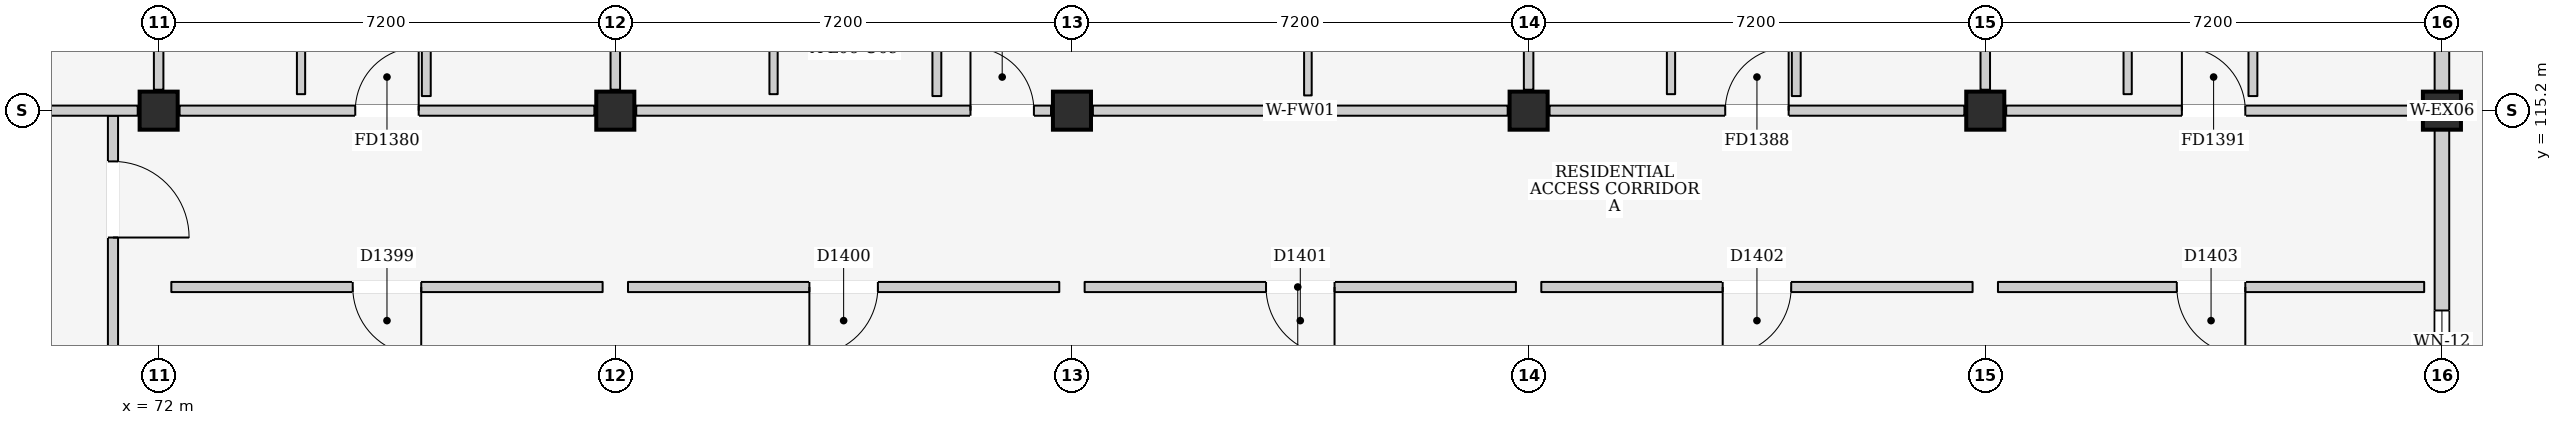
"""IFC4 building model, lengths in metres.
Left out: names, types, materials, properties, quantities, classifications, styles, units other than length and angle.
Written with IfcOpenShell. Run it as: python <this file> out.ifc"""

import sys

from ifc_helpers import new_model, si_unit, direction, frame, frame_2d, origin, origin_2d, place, context, subcontext, project, spatial, rectangle, extrude, element, fill, save


model = new_model("IFC4")
c1 = context("Model", 3, precision=1e-05, world=origin(), true_north=direction((0.0, 1.0)))
c2 = subcontext(c1, "Body", "Model", "MODEL_VIEW")
j1 = project(units=[si_unit("LENGTHUNIT", "METRE"), si_unit("PLANEANGLEUNIT", "RADIAN")], contexts=[c1])
p1 = place(None, origin())
s1 = spatial("IfcSite", under=j1, at=p1, CompositionType="ELEMENT")
p2 = place(p1, origin())
s2 = spatial("IfcBuilding", under=s1, at=p2, CompositionType="ELEMENT")
p3 = place(p2, frame((0.0, 0.0, 21.9)))
s3 = spatial("IfcBuildingStorey", under=s2, at=p3, CompositionType="ELEMENT", Elevation=21.9)
for number, where, z_axis, x_axis in (
    (1, (72.0, 115.2, 0.0), (0.0, 0.0, 1.0), (1.0, 0.0, 0.0)),
    (2, (79.2, 115.2, 0.0), (0.0, 0.0, 1.0), (1.0, 0.0, 0.0)),
    (3, (86.4, 115.2, 0.0), (0.0, 0.0, 1.0), (1.0, 0.0, 0.0)),
    (4, (93.6, 115.2, 0.0), (0.0, 0.0, 1.0), (1.0, 0.0, 0.0)),
    (5, (100.8, 115.2, 0.0), (0.0, 0.0, 1.0), (1.0, 0.0, 0.0)),
    (6, (108.0, 115.2, 0.0), (0.0, 0.0, 1.0), (1.0, 0.0, 0.0)),
):
    element("IfcColumn", number, at=place(p3, frame(where, z_axis=z_axis, x_axis=x_axis)), inside=s3, PredefinedType="COLUMN", context=c2, shape_type="SweptSolid", body=[
        extrude(rectangle(XDim=0.6, YDim=0.6, at=origin_2d()), origin(), (0.0, 0.0, 1.0), 3.2),
    ])
p4 = place(p3, frame((108.0, 108.3, 0.0), z_axis=(0.0, 0.0, 1.0), x_axis=(0.0, 1.0, 0.0)))
e7 = element("IfcWall", 7, at=p4, inside=s3, PredefinedType="ELEMENTEDWALL", context=c2, shape_type="SweptSolid", body=[
    extrude(rectangle(XDim=6.6, YDim=0.23, at=frame_2d((3.3, 0.0))), origin(), (0.0, 0.0, 1.0), 2.465),
])
p5 = place(p4, frame((2.75, 0.0, 1.1)))
e8 = element("IfcOpeningElement", 8, at=p5, cuts=e7, PredefinedType="OPENING", context=c2, shape_type="SweptSolid", body=[
    extrude(rectangle(XDim=1.0, YDim=0.9, at=frame_2d((0.5, 0.45))), frame((0.0, 0.13, 0.0), z_axis=(0.0, -1.0, 0.0), x_axis=(1.0, 0.0, 0.0)), (0.0, 0.0, 1.0), 0.26),
])
p6 = place(p3, frame((108.0, 115.5, 0.0), z_axis=(0.0, 0.0, 1.0), x_axis=(0.0, 1.0, 0.0)))
e9 = element("IfcWall", 9, at=p6, inside=s3, PredefinedType="ELEMENTEDWALL", context=c2, shape_type="SweptSolid", body=[
    extrude(rectangle(XDim=6.6, YDim=0.23, at=frame_2d((3.3, 0.0))), origin(), (0.0, 0.0, 1.0), 2.465),
])
p7 = place(p6, frame((3.6, 0.0, 0.0)))
e10 = element("IfcOpeningElement", 10, at=p7, cuts=e9, PredefinedType="OPENING", context=c2, shape_type="SweptSolid", body=[
    extrude(rectangle(XDim=1.08, YDim=2.12, at=frame_2d((0.54, 1.06))), frame((0.0, 0.13, 0.0), z_axis=(0.0, -1.0, 0.0), x_axis=(1.0, 0.0, 0.0)), (0.0, 0.0, 1.0), 0.26),
])
p8 = place(p3, frame((71.28, 110.8, 0.0), z_axis=(0.0, 0.0, 1.0), x_axis=(0.0, 1.0, 0.0)))
e11 = element("IfcWall", 11, at=p8, inside=s3, PredefinedType="PARTITIONING", context=c2, shape_type="SweptSolid", body=[
    extrude(rectangle(XDim=4.32, YDim=0.16, at=frame_2d((2.16, 0.0))), origin(), (0.0, 0.0, 1.0), 2.98),
])
p9 = place(p8, frame((2.4, 0.0, 0.0)))
e12 = element("IfcOpeningElement", 12, at=p9, cuts=e11, PredefinedType="OPENING", context=c2, shape_type="SweptSolid", body=[
    extrude(rectangle(XDim=1.2, YDim=2.2, at=frame_2d((0.6, 1.1))), frame((0.0, 0.095, 0.0), z_axis=(0.0, -1.0, 0.0), x_axis=(1.0, 0.0, 0.0)), (0.0, 0.0, 1.0), 0.19),
])
p10 = place(p3, frame((65.13, 115.2, 0.0), z_axis=(0.0, 0.0, 1.0), x_axis=(1.0, 0.0, 0.0)))
e13 = element("IfcWall", 13, at=p10, inside=s3, PredefinedType="PARTITIONING", context=c2, shape_type="SweptSolid", body=[
    extrude(rectangle(XDim=6.54, YDim=0.16, at=frame_2d((3.27, 0.0))), origin(), (0.0, 0.0, 1.0), 2.315),
])
p11 = place(p10, frame((2.77, 0.0, 0.0)))
e14 = element("IfcOpeningElement", 14, at=p11, cuts=e13, PredefinedType="OPENING", context=c2, shape_type="SweptSolid", body=[
    extrude(rectangle(XDim=1.0, YDim=2.15, at=frame_2d((0.5, 1.075))), frame((0.0, 0.095, 0.0), z_axis=(0.0, -1.0, 0.0), x_axis=(1.0, 0.0, 0.0)), (0.0, 0.0, 1.0), 0.19),
])
p12 = place(p3, frame((72.0, 115.53, 0.0), z_axis=(0.0, 0.0, 1.0), x_axis=(0.0, 1.0, 0.0)))
e15 = element("IfcWall", 15, at=p12, inside=s3, PredefinedType="PARTITIONING", context=c2, shape_type="SweptSolid", body=[
    extrude(rectangle(XDim=6.54, YDim=0.15, at=frame_2d((3.27, 0.0))), origin(), (0.0, 0.0, 1.0), 2.465),
])
p13 = place(p3, frame((72.33, 115.2, 0.0), z_axis=(0.0, 0.0, 1.0), x_axis=(1.0, 0.0, 0.0)))
e16 = element("IfcWall", 16, at=p13, inside=s3, PredefinedType="PARTITIONING", context=c2, shape_type="SweptSolid", body=[
    extrude(rectangle(XDim=6.54, YDim=0.16, at=frame_2d((3.27, 0.0))), origin(), (0.0, 0.0, 1.0), 2.315),
])
p14 = place(p13, frame((2.77, 0.0, 0.0)))
e17 = element("IfcOpeningElement", 17, at=p14, cuts=e16, PredefinedType="OPENING", context=c2, shape_type="SweptSolid", body=[
    extrude(rectangle(XDim=1.0, YDim=2.15, at=frame_2d((0.5, 1.075))), frame((0.0, 0.095, 0.0), z_axis=(0.0, -1.0, 0.0), x_axis=(1.0, 0.0, 0.0)), (0.0, 0.0, 1.0), 0.19),
])
p15 = place(p3, frame((79.2, 115.53, 0.0), z_axis=(0.0, 0.0, 1.0), x_axis=(0.0, 1.0, 0.0)))
e18 = element("IfcWall", 18, at=p15, inside=s3, PredefinedType="PARTITIONING", context=c2, shape_type="SweptSolid", body=[
    extrude(rectangle(XDim=6.54, YDim=0.15, at=frame_2d((3.27, 0.0))), origin(), (0.0, 0.0, 1.0), 2.465),
])
p16 = place(p3, frame((74.245, 115.46, 0.0), z_axis=(0.0, 0.0, 1.0), x_axis=(0.0, 1.0, 0.0)))
e19 = element("IfcWall", 19, at=p16, inside=s3, PredefinedType="PARTITIONING", context=c2, shape_type="SweptSolid", body=[
    extrude(rectangle(XDim=2.13, YDim=0.13, at=frame_2d((1.065, 0.0))), origin(), (0.0, 0.0, 1.0), 2.98),
])
p17 = place(p3, frame((76.22, 115.43, 0.0), z_axis=(0.0, 0.0, 1.0), x_axis=(0.0, 1.0, 0.0)))
e20 = element("IfcWall", 20, at=p17, inside=s3, PredefinedType="PARTITIONING", context=c2, shape_type="SweptSolid", body=[
    extrude(rectangle(XDim=2.15, YDim=0.14, at=frame_2d((1.075, 0.0))), origin(), (0.0, 0.0, 1.0), 2.98),
])
p18 = place(p3, frame((79.53, 115.2, 0.0), z_axis=(0.0, 0.0, 1.0), x_axis=(1.0, 0.0, 0.0)))
e21 = element("IfcWall", 21, at=p18, inside=s3, PredefinedType="PARTITIONING", context=c2, shape_type="SweptSolid", body=[
    extrude(rectangle(XDim=6.54, YDim=0.16, at=frame_2d((3.27, 0.0))), origin(), (0.0, 0.0, 1.0), 2.315),
])
p19 = place(p18, frame((5.27, 0.0, 0.0)))
e22 = element("IfcOpeningElement", 22, at=p19, cuts=e21, PredefinedType="OPENING", context=c2, shape_type="SweptSolid", body=[
    extrude(rectangle(XDim=1.0, YDim=2.15, at=frame_2d((0.5, 1.075))), frame((0.0, 0.095, 0.0), z_axis=(0.0, -1.0, 0.0), x_axis=(1.0, 0.0, 0.0)), (0.0, 0.0, 1.0), 0.19),
])
p20 = place(p3, frame((86.73, 115.2, 0.0), z_axis=(0.0, 0.0, 1.0), x_axis=(1.0, 0.0, 0.0)))
e23 = element("IfcWall", 23, at=p20, inside=s3, PredefinedType="PARTITIONING", context=c2, shape_type="SweptSolid", body=[
    extrude(rectangle(XDim=6.54, YDim=0.16, at=frame_2d((3.27, 0.0))), origin(), (0.0, 0.0, 1.0), 2.315),
])
p21 = place(p3, frame((93.6, 115.53, 0.0), z_axis=(0.0, 0.0, 1.0), x_axis=(0.0, 1.0, 0.0)))
e24 = element("IfcWall", 24, at=p21, inside=s3, PredefinedType="PARTITIONING", context=c2, shape_type="SweptSolid", body=[
    extrude(rectangle(XDim=6.54, YDim=0.15, at=frame_2d((3.27, 0.0))), origin(), (0.0, 0.0, 1.0), 2.465),
])
p22 = place(p3, frame((81.695, 115.46, 0.0), z_axis=(0.0, 0.0, 1.0), x_axis=(0.0, 1.0, 0.0)))
e25 = element("IfcWall", 25, at=p22, inside=s3, PredefinedType="PARTITIONING", context=c2, shape_type="SweptSolid", body=[
    extrude(rectangle(XDim=3.04, YDim=0.13, at=frame_2d((1.52, 0.0))), origin(), (0.0, 0.0, 1.0), 2.98),
])
p23 = place(p3, frame((84.27, 115.43, 0.0), z_axis=(0.0, 0.0, 1.0), x_axis=(0.0, 1.0, 0.0)))
e26 = element("IfcWall", 26, at=p23, inside=s3, PredefinedType="PARTITIONING", context=c2, shape_type="SweptSolid", body=[
    extrude(rectangle(XDim=3.06, YDim=0.14, at=frame_2d((1.53, 0.0))), origin(), (0.0, 0.0, 1.0), 2.98),
])
p24 = place(p3, frame((90.12, 115.44, 0.0), z_axis=(0.0, 0.0, 1.0), x_axis=(0.0, 1.0, 0.0)))
e27 = element("IfcWall", 27, at=p24, inside=s3, PredefinedType="PARTITIONING", context=c2, shape_type="SweptSolid", body=[
    extrude(rectangle(XDim=3.04, YDim=0.12, at=frame_2d((1.52, 0.0))), origin(), (0.0, 0.0, 1.0), 2.98),
])
p25 = place(p24, frame((1.04, 0.0, 0.0)))
e28 = element("IfcOpeningElement", 28, at=p25, cuts=e27, PredefinedType="OPENING", context=c2, shape_type="SweptSolid", body=[
    extrude(rectangle(XDim=0.96, YDim=2.15, at=frame_2d((0.48, 1.075))), frame((0.0, 0.075, 0.0), z_axis=(0.0, -1.0, 0.0), x_axis=(1.0, 0.0, 0.0)), (0.0, 0.0, 1.0), 0.15),
])
p26 = place(p3, frame((93.93, 115.2, 0.0), z_axis=(0.0, 0.0, 1.0), x_axis=(1.0, 0.0, 0.0)))
e29 = element("IfcWall", 29, at=p26, inside=s3, PredefinedType="PARTITIONING", context=c2, shape_type="SweptSolid", body=[
    extrude(rectangle(XDim=6.54, YDim=0.16, at=frame_2d((3.27, 0.0))), origin(), (0.0, 0.0, 1.0), 2.315),
])
p27 = place(p26, frame((2.77, 0.0, 0.0)))
e30 = element("IfcOpeningElement", 30, at=p27, cuts=e29, PredefinedType="OPENING", context=c2, shape_type="SweptSolid", body=[
    extrude(rectangle(XDim=1.0, YDim=2.15, at=frame_2d((0.5, 1.075))), frame((0.0, 0.095, 0.0), z_axis=(0.0, -1.0, 0.0), x_axis=(1.0, 0.0, 0.0)), (0.0, 0.0, 1.0), 0.19),
])
p28 = place(p3, frame((100.8, 115.53, 0.0), z_axis=(0.0, 0.0, 1.0), x_axis=(0.0, 1.0, 0.0)))
e31 = element("IfcWall", 31, at=p28, inside=s3, PredefinedType="PARTITIONING", context=c2, shape_type="SweptSolid", body=[
    extrude(rectangle(XDim=6.54, YDim=0.15, at=frame_2d((3.27, 0.0))), origin(), (0.0, 0.0, 1.0), 2.465),
])
p29 = place(p3, frame((95.845, 115.46, 0.0), z_axis=(0.0, 0.0, 1.0), x_axis=(0.0, 1.0, 0.0)))
e32 = element("IfcWall", 32, at=p29, inside=s3, PredefinedType="PARTITIONING", context=c2, shape_type="SweptSolid", body=[
    extrude(rectangle(XDim=2.13, YDim=0.13, at=frame_2d((1.065, 0.0))), origin(), (0.0, 0.0, 1.0), 2.98),
])
p30 = place(p3, frame((97.82, 115.43, 0.0), z_axis=(0.0, 0.0, 1.0), x_axis=(0.0, 1.0, 0.0)))
e33 = element("IfcWall", 33, at=p30, inside=s3, PredefinedType="PARTITIONING", context=c2, shape_type="SweptSolid", body=[
    extrude(rectangle(XDim=2.15, YDim=0.14, at=frame_2d((1.075, 0.0))), origin(), (0.0, 0.0, 1.0), 2.98),
])
p31 = place(p3, frame((101.13, 115.2, 0.0), z_axis=(0.0, 0.0, 1.0), x_axis=(1.0, 0.0, 0.0)))
e34 = element("IfcWall", 34, at=p31, inside=s3, PredefinedType="PARTITIONING", context=c2, shape_type="SweptSolid", body=[
    extrude(rectangle(XDim=6.54, YDim=0.16, at=frame_2d((3.27, 0.0))), origin(), (0.0, 0.0, 1.0), 2.315),
])
p32 = place(p31, frame((2.77, 0.0, 0.0)))
e35 = element("IfcOpeningElement", 35, at=p32, cuts=e34, PredefinedType="OPENING", context=c2, shape_type="SweptSolid", body=[
    extrude(rectangle(XDim=1.0, YDim=2.15, at=frame_2d((0.5, 1.075))), frame((0.0, 0.095, 0.0), z_axis=(0.0, -1.0, 0.0), x_axis=(1.0, 0.0, 0.0)), (0.0, 0.0, 1.0), 0.19),
])
p33 = place(p3, frame((103.045, 115.46, 0.0), z_axis=(0.0, 0.0, 1.0), x_axis=(0.0, 1.0, 0.0)))
e36 = element("IfcWall", 36, at=p33, inside=s3, PredefinedType="PARTITIONING", context=c2, shape_type="SweptSolid", body=[
    extrude(rectangle(XDim=2.13, YDim=0.13, at=frame_2d((1.065, 0.0))), origin(), (0.0, 0.0, 1.0), 2.98),
])
p34 = place(p3, frame((105.02, 115.43, 0.0), z_axis=(0.0, 0.0, 1.0), x_axis=(0.0, 1.0, 0.0)))
e37 = element("IfcWall", 37, at=p34, inside=s3, PredefinedType="PARTITIONING", context=c2, shape_type="SweptSolid", body=[
    extrude(rectangle(XDim=2.15, YDim=0.14, at=frame_2d((1.075, 0.0))), origin(), (0.0, 0.0, 1.0), 2.98),
])
p35 = place(p3, frame((72.2, 112.42, 0.0), z_axis=(0.0, 0.0, 1.0), x_axis=(1.0, 0.0, 0.0)))
e38 = element("IfcWall", 38, at=p35, inside=s3, PredefinedType="PARTITIONING", context=c2, shape_type="SweptSolid", body=[
    extrude(rectangle(XDim=6.8, YDim=0.16, at=frame_2d((3.4, 0.0))), origin(), (0.0, 0.0, 1.0), 2.98),
])
p36 = place(p35, frame((2.86, 0.0, 0.0)))
e39 = element("IfcOpeningElement", 39, at=p36, cuts=e38, PredefinedType="OPENING", context=c2, shape_type="SweptSolid", body=[
    extrude(rectangle(XDim=1.08, YDim=2.22, at=frame_2d((0.54, 1.11))), frame((0.0, 0.095, 0.0), z_axis=(0.0, -1.0, 0.0), x_axis=(1.0, 0.0, 0.0)), (0.0, 0.0, 1.0), 0.19),
])
p37 = place(p3, frame((79.4, 112.42, 0.0), z_axis=(0.0, 0.0, 1.0), x_axis=(1.0, 0.0, 0.0)))
e40 = element("IfcWall", 40, at=p37, inside=s3, PredefinedType="PARTITIONING", context=c2, shape_type="SweptSolid", body=[
    extrude(rectangle(XDim=6.8, YDim=0.16, at=frame_2d((3.4, 0.0))), origin(), (0.0, 0.0, 1.0), 2.98),
])
p38 = place(p37, frame((2.86, 0.0, 0.0)))
e41 = element("IfcOpeningElement", 41, at=p38, cuts=e40, PredefinedType="OPENING", context=c2, shape_type="SweptSolid", body=[
    extrude(rectangle(XDim=1.08, YDim=2.22, at=frame_2d((0.54, 1.11))), frame((0.0, 0.095, 0.0), z_axis=(0.0, -1.0, 0.0), x_axis=(1.0, 0.0, 0.0)), (0.0, 0.0, 1.0), 0.19),
])
p39 = place(p3, frame((86.6, 112.42, 0.0), z_axis=(0.0, 0.0, 1.0), x_axis=(1.0, 0.0, 0.0)))
e42 = element("IfcWall", 42, at=p39, inside=s3, PredefinedType="PARTITIONING", context=c2, shape_type="SweptSolid", body=[
    extrude(rectangle(XDim=6.8, YDim=0.16, at=frame_2d((3.4, 0.0))), origin(), (0.0, 0.0, 1.0), 2.98),
])
p40 = place(p39, frame((2.86, 0.0, 0.0)))
e43 = element("IfcOpeningElement", 43, at=p40, cuts=e42, PredefinedType="OPENING", context=c2, shape_type="SweptSolid", body=[
    extrude(rectangle(XDim=1.08, YDim=2.22, at=frame_2d((0.54, 1.11))), frame((0.0, 0.095, 0.0), z_axis=(0.0, -1.0, 0.0), x_axis=(1.0, 0.0, 0.0)), (0.0, 0.0, 1.0), 0.19),
])
p41 = place(p3, frame((93.8, 112.42, 0.0), z_axis=(0.0, 0.0, 1.0), x_axis=(1.0, 0.0, 0.0)))
e44 = element("IfcWall", 44, at=p41, inside=s3, PredefinedType="PARTITIONING", context=c2, shape_type="SweptSolid", body=[
    extrude(rectangle(XDim=6.8, YDim=0.16, at=frame_2d((3.4, 0.0))), origin(), (0.0, 0.0, 1.0), 2.98),
])
p42 = place(p41, frame((2.86, 0.0, 0.0)))
e45 = element("IfcOpeningElement", 45, at=p42, cuts=e44, PredefinedType="OPENING", context=c2, shape_type="SweptSolid", body=[
    extrude(rectangle(XDim=1.08, YDim=2.22, at=frame_2d((0.54, 1.11))), frame((0.0, 0.095, 0.0), z_axis=(0.0, -1.0, 0.0), x_axis=(1.0, 0.0, 0.0)), (0.0, 0.0, 1.0), 0.19),
])
p43 = place(p3, frame((101.0, 112.42, 0.0), z_axis=(0.0, 0.0, 1.0), x_axis=(1.0, 0.0, 0.0)))
e46 = element("IfcWall", 46, at=p43, inside=s3, PredefinedType="PARTITIONING", context=c2, shape_type="SweptSolid", body=[
    extrude(rectangle(XDim=6.72, YDim=0.16, at=frame_2d((3.36, 0.0))), origin(), (0.0, 0.0, 1.0), 2.98),
])
p44 = place(p43, frame((2.82, 0.0, 0.0)))
e47 = element("IfcOpeningElement", 47, at=p44, cuts=e46, PredefinedType="OPENING", context=c2, shape_type="SweptSolid", body=[
    extrude(rectangle(XDim=1.08, YDim=2.22, at=frame_2d((0.54, 1.11))), frame((0.0, 0.095, 0.0), z_axis=(0.0, -1.0, 0.0), x_axis=(1.0, 0.0, 0.0)), (0.0, 0.0, 1.0), 0.19),
])
p45 = place(p5, origin())
e48 = element("IfcWindow", 48, at=p45, inside=s3, PartitioningType="SINGLE_PANEL", PredefinedType="WINDOW", context=c2, shape_type="SweptSolid", body=[
    extrude(rectangle(XDim=1.0, YDim=0.9, at=frame_2d((0.5, 0.45))), frame((0.0, 0.03, 0.0), z_axis=(0.0, -1.0, 0.0), x_axis=(1.0, 0.0, 0.0)), (0.0, 0.0, 1.0), 0.06),
])
fill(e8, e48)
p46 = place(p9, frame((1.2, 0.0, 0.0), z_axis=(0.0, 0.0, 1.0), x_axis=(-1.0, 0.0, 0.0)))
e49 = element("IfcDoor", 49, at=p46, inside=s3, OperationType="SINGLE_SWING_RIGHT", PredefinedType="DOOR", context=c2, shape_type="SweptSolid", body=[
    extrude(rectangle(XDim=1.2, YDim=2.2, at=frame_2d((0.6, 1.1))), frame((0.0, 0.025, 0.0), z_axis=(0.0, -1.0, 0.0), x_axis=(1.0, 0.0, 0.0)), (0.0, 0.0, 1.0), 0.05),
])
fill(e12, e49)
p47 = place(p14, origin())
e50 = element("IfcDoor", 50, at=p47, inside=s3, OperationType="SINGLE_SWING_RIGHT", PredefinedType="DOOR", context=c2, shape_type="SweptSolid", body=[
    extrude(rectangle(XDim=1.0, YDim=2.15, at=frame_2d((0.5, 1.075))), frame((0.0, 0.025, 0.0), z_axis=(0.0, -1.0, 0.0), x_axis=(1.0, 0.0, 0.0)), (0.0, 0.0, 1.0), 0.05),
])
fill(e17, e50)
p48 = place(p19, origin())
e51 = element("IfcDoor", 51, at=p48, inside=s3, OperationType="SINGLE_SWING_LEFT", PredefinedType="DOOR", context=c2, shape_type="SweptSolid", body=[
    extrude(rectangle(XDim=1.0, YDim=2.15, at=frame_2d((0.5, 1.075))), frame((0.0, 0.025, 0.0), z_axis=(0.0, -1.0, 0.0), x_axis=(1.0, 0.0, 0.0)), (0.0, 0.0, 1.0), 0.05),
])
fill(e22, e51)
p49 = place(p27, origin())
e52 = element("IfcDoor", 52, at=p49, inside=s3, OperationType="SINGLE_SWING_RIGHT", PredefinedType="DOOR", context=c2, shape_type="SweptSolid", body=[
    extrude(rectangle(XDim=1.0, YDim=2.15, at=frame_2d((0.5, 1.075))), frame((0.0, 0.025, 0.0), z_axis=(0.0, -1.0, 0.0), x_axis=(1.0, 0.0, 0.0)), (0.0, 0.0, 1.0), 0.05),
])
fill(e30, e52)
p50 = place(p32, origin())
e53 = element("IfcDoor", 53, at=p50, inside=s3, OperationType="SINGLE_SWING_LEFT", PredefinedType="DOOR", context=c2, shape_type="SweptSolid", body=[
    extrude(rectangle(XDim=1.0, YDim=2.15, at=frame_2d((0.5, 1.075))), frame((0.0, 0.025, 0.0), z_axis=(0.0, -1.0, 0.0), x_axis=(1.0, 0.0, 0.0)), (0.0, 0.0, 1.0), 0.05),
])
fill(e35, e53)
p51 = place(p36, frame((1.08, 0.0, 0.0), z_axis=(0.0, 0.0, 1.0), x_axis=(-1.0, 0.0, 0.0)))
e54 = element("IfcDoor", 54, at=p51, inside=s3, OperationType="SINGLE_SWING_LEFT", PredefinedType="DOOR", context=c2, shape_type="SweptSolid", body=[
    extrude(rectangle(XDim=1.08, YDim=2.22, at=frame_2d((0.54, 1.11))), frame((0.0, 0.025, 0.0), z_axis=(0.0, -1.0, 0.0), x_axis=(1.0, 0.0, 0.0)), (0.0, 0.0, 1.0), 0.05),
])
fill(e39, e54)
p52 = place(p38, frame((1.08, 0.0, 0.0), z_axis=(0.0, 0.0, 1.0), x_axis=(-1.0, 0.0, 0.0)))
e55 = element("IfcDoor", 55, at=p52, inside=s3, OperationType="SINGLE_SWING_RIGHT", PredefinedType="DOOR", context=c2, shape_type="SweptSolid", body=[
    extrude(rectangle(XDim=1.08, YDim=2.22, at=frame_2d((0.54, 1.11))), frame((0.0, 0.025, 0.0), z_axis=(0.0, -1.0, 0.0), x_axis=(1.0, 0.0, 0.0)), (0.0, 0.0, 1.0), 0.05),
])
fill(e41, e55)
p53 = place(p40, frame((1.08, 0.0, 0.0), z_axis=(0.0, 0.0, 1.0), x_axis=(-1.0, 0.0, 0.0)))
e56 = element("IfcDoor", 56, at=p53, inside=s3, OperationType="SINGLE_SWING_LEFT", PredefinedType="DOOR", context=c2, shape_type="SweptSolid", body=[
    extrude(rectangle(XDim=1.08, YDim=2.22, at=frame_2d((0.54, 1.11))), frame((0.0, 0.025, 0.0), z_axis=(0.0, -1.0, 0.0), x_axis=(1.0, 0.0, 0.0)), (0.0, 0.0, 1.0), 0.05),
])
fill(e43, e56)
p54 = place(p42, frame((1.08, 0.0, 0.0), z_axis=(0.0, 0.0, 1.0), x_axis=(-1.0, 0.0, 0.0)))
e57 = element("IfcDoor", 57, at=p54, inside=s3, OperationType="SINGLE_SWING_RIGHT", PredefinedType="DOOR", context=c2, shape_type="SweptSolid", body=[
    extrude(rectangle(XDim=1.08, YDim=2.22, at=frame_2d((0.54, 1.11))), frame((0.0, 0.025, 0.0), z_axis=(0.0, -1.0, 0.0), x_axis=(1.0, 0.0, 0.0)), (0.0, 0.0, 1.0), 0.05),
])
fill(e45, e57)
p55 = place(p44, frame((1.08, 0.0, 0.0), z_axis=(0.0, 0.0, 1.0), x_axis=(-1.0, 0.0, 0.0)))
e58 = element("IfcDoor", 58, at=p55, inside=s3, OperationType="SINGLE_SWING_LEFT", PredefinedType="DOOR", context=c2, shape_type="SweptSolid", body=[
    extrude(rectangle(XDim=1.08, YDim=2.22, at=frame_2d((0.54, 1.11))), frame((0.0, 0.025, 0.0), z_axis=(0.0, -1.0, 0.0), x_axis=(1.0, 0.0, 0.0)), (0.0, 0.0, 1.0), 0.05),
])
fill(e47, e58)
save(model, sys.argv[1])
